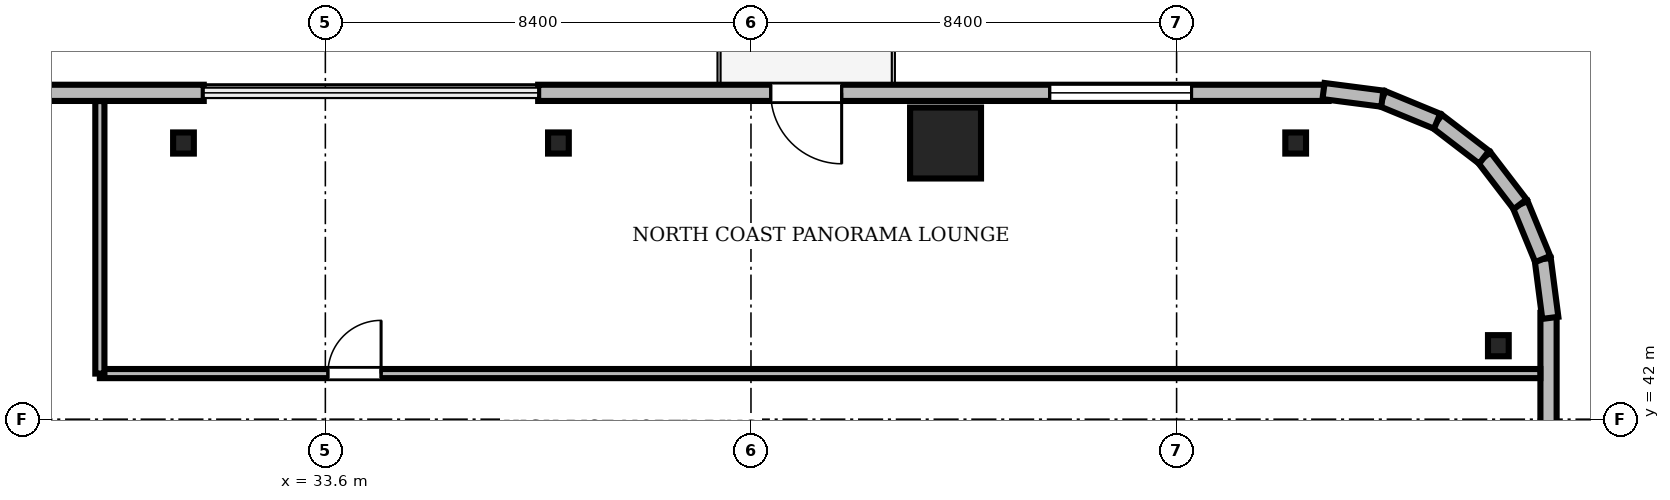
"""IFC4 building model, lengths in metres.
Left out: names, types, materials, properties, quantities, classifications, styles, units other than length and angle.
Written with IfcOpenShell. Run it as: python <this file> out.ifc"""

import sys

from ifc_helpers import new_model, si_unit, direction, frame, frame_2d, origin, origin_2d, place, context, subcontext, project, spatial, rectangle, i_section, extrude, source, transform, mapped, element, fill, save


model = new_model("IFC4")
c1 = context("Model", 3, precision=1e-05, world=origin(), true_north=direction((0.0, 1.0)))
c2 = subcontext(c1, "Body", "Model", "MODEL_VIEW")
j1 = project(units=[si_unit("LENGTHUNIT", "METRE"), si_unit("PLANEANGLEUNIT", "RADIAN")], contexts=[c1])
p1 = place(None, origin())
s1 = spatial("IfcSite", under=j1, at=p1, CompositionType="ELEMENT")
p2 = place(p1, origin())
s2 = spatial("IfcBuilding", under=s1, at=p2, CompositionType="ELEMENT")
p3 = place(p2, frame((0.0, 0.0, 203.55)))
s3 = spatial("IfcBuildingStorey", under=s2, at=p3, CompositionType="ELEMENT", Elevation=203.55)
m1 = source(origin(), c2, "Body", "SweptSolid", [
    extrude(rectangle(XDim=1.4, YDim=1.4, at=origin_2d()), origin(), (0.0, 0.0, 1.0), 3.53),
])
p4 = place(p3, frame((45.84, 47.45, 0.0), z_axis=(0.0, 0.0, 1.0), x_axis=(1.0, 0.0, 0.0)))
e1 = element("IfcColumn", 1, at=p4, inside=s3, PredefinedType="COLUMN", context=c2, shape_type="MappedRepresentation", body=[
    mapped(m1, transform((0.0, 0.0, 0.0), scale=1.0)),
])
m2 = source(origin(), c2, "Body", "SweptSolid", [
    extrude(i_section(OverallWidth=0.409, OverallDepth=0.417, WebThickness=0.021, FlangeThickness=0.033, FilletRadius=0.015, at=origin_2d()), origin(), (0.0, 0.0, 1.0), 3.53),
])
for number, where, z_axis, x_axis in (
    (2, (56.75, 43.45, 0.0), (0.0, 0.0, 1.0), (1.0, 0.0, 0.0)),
    (3, (52.75, 47.45, 0.0), (0.0, 0.0, 1.0), (1.0, 0.0, 0.0)),
    (4, (38.2, 47.45, 0.0), (0.0, 0.0, 1.0), (1.0, 0.0, 0.0)),
    (5, (30.8, 47.45, 0.0), (0.0, 0.0, 1.0), (1.0, 0.0, 0.0)),
):
    element("IfcColumn", number, at=place(p3, frame(where, z_axis=z_axis, x_axis=x_axis)), inside=s3, PredefinedType="COLUMN", context=c2, shape_type="MappedRepresentation", body=[
        mapped(m2, transform((0.0, 0.0, 0.0), scale=1.0)),
    ])
m3 = source(origin(), c2, "Body", "SweptSolid", [
    extrude(rectangle(XDim=15.6, YDim=0.32, at=frame_2d((7.8, 0.0))), origin(), (0.0, 0.0, 1.0), 3.53),
])
p5 = place(p3, frame((53.4, 48.44, 0.0), z_axis=(0.0, 0.0, 1.0), x_axis=(-1.0, 0.0, 0.0)))
e6 = element("IfcWall", 6, at=p5, inside=s3, PredefinedType="SOLIDWALL", context=c2, shape_type="MappedRepresentation", body=[
    mapped(m3, transform((0.0, 0.0, 0.0), scale=1.0)),
])
m4 = source(origin(), c2, "Body", "SweptSolid", [
    extrude(rectangle(XDim=1.4, YDim=2.3, at=frame_2d((0.7, 1.15))), frame((0.0, 0.17, 0.0), z_axis=(0.0, -1.0, 0.0), x_axis=(1.0, 0.0, 0.0)), (0.0, 0.0, 1.0), 0.34),
])
p6 = place(p5, frame((9.61, 0.0, 0.0)))
e7 = element("IfcOpeningElement", 7, at=p6, cuts=e6, PredefinedType="OPENING", context=c2, shape_type="MappedRepresentation", body=[
    mapped(m4, transform((0.0, 0.0, 0.0), scale=1.0)),
])
m5 = source(origin(), c2, "Body", "SweptSolid", [
    extrude(rectangle(XDim=2.8, YDim=2.4, at=frame_2d((1.4, 1.2))), frame((0.0, 0.17, 0.0), z_axis=(0.0, -1.0, 0.0), x_axis=(1.0, 0.0, 0.0)), (0.0, 0.0, 1.0), 0.34),
])
p7 = place(p5, frame((2.705, 0.0, 0.72)))
e8 = element("IfcOpeningElement", 8, at=p7, cuts=e6, PredefinedType="OPENING", context=c2, shape_type="MappedRepresentation", body=[
    mapped(m5, transform((0.0, 0.0, 0.0), scale=1.0)),
])
p8 = place(p3, frame((31.2, 48.44, 0.0), z_axis=(0.0, 0.0, 1.0), x_axis=(-1.0, 0.0, 0.0)))
e9 = element("IfcWall", 9, at=p8, inside=s3, PredefinedType="SOLIDWALL", context=c2, shape_type="MappedRepresentation", body=[
    mapped(m3, transform((0.0, 0.0, 0.0), scale=1.0)),
])
p9 = place(p8, frame((10.095, 0.0, 0.72)))
e10 = element("IfcOpeningElement", 10, at=p9, cuts=e9, PredefinedType="OPENING", context=c2, shape_type="MappedRepresentation", body=[
    mapped(m5, transform((0.0, 0.0, 0.0), scale=1.0)),
])
m6 = source(origin(), c2, "Body", "SweptSolid", [
    extrude(rectangle(XDim=15.6, YDim=0.32, at=frame_2d((7.8, 0.0))), origin(), (0.0, 0.0, 1.0), 3.53),
])
p10 = place(p3, frame((57.74, 28.5, 0.0), z_axis=(0.0, 0.0, 1.0), x_axis=(0.0, 1.0, 0.0)))
e11 = element("IfcWall", 11, at=p10, inside=s3, PredefinedType="SOLIDWALL", context=c2, shape_type="MappedRepresentation", body=[
    mapped(m6, transform((0.0, 0.0, 0.0), scale=1.0)),
])
p11 = place(p10, frame((10.095, 0.0, 0.72)))
e12 = element("IfcOpeningElement", 12, at=p11, cuts=e11, PredefinedType="OPENING", context=c2, shape_type="MappedRepresentation", body=[
    mapped(m5, transform((0.0, 0.0, 0.0), scale=1.0)),
])
m7 = source(origin(), c2, "Body", "SweptSolid", [
    extrude(rectangle(XDim=1.17, YDim=0.32, at=frame_2d((0.585, 0.0))), origin(), (0.0, 0.0, 1.0), 3.53),
])
p12 = place(p3, frame((57.776, 44.0, 0.0), z_axis=(0.0, 0.0, 1.0), x_axis=(-0.128295670475, 0.991735963317, 0.0)))
e13 = element("IfcWall", 13, at=p12, inside=s3, PredefinedType="SOLIDWALL", context=c2, shape_type="MappedRepresentation", body=[
    mapped(m7, transform((0.0, 0.0, 0.0), scale=1.0)),
])
m8 = source(origin(), c2, "Body", "SweptSolid", [
    extrude(rectangle(XDim=1.169, YDim=0.32, at=frame_2d((0.584, 0.0))), origin(), (0.0, 0.0, 1.0), 3.53),
])
p13 = place(p3, frame((57.625, 45.16, 0.0), z_axis=(0.0, 0.0, 1.0), x_axis=(-0.381054331552, 0.924552646638, 0.0)))
e14 = element("IfcWall", 14, at=p13, inside=s3, PredefinedType="SOLIDWALL", context=c2, shape_type="MappedRepresentation", body=[
    mapped(m8, transform((0.0, 0.0, 0.0), scale=1.0)),
])
m9 = source(origin(), c2, "Body", "SweptSolid", [
    extrude(rectangle(XDim=1.169, YDim=0.32, at=frame_2d((0.584, 0.0))), origin(), (0.0, 0.0, 1.0), 3.53),
])
p14 = place(p3, frame((57.18, 46.241, 0.0), z_axis=(0.0, 0.0, 1.0), x_axis=(-0.608387696831, 0.793639975269, 0.0)))
e15 = element("IfcWall", 15, at=p14, inside=s3, PredefinedType="SOLIDWALL", context=c2, shape_type="MappedRepresentation", body=[
    mapped(m9, transform((0.0, 0.0, 0.0), scale=1.0)),
])
m10 = source(origin(), c2, "Body", "SweptSolid", [
    extrude(rectangle(XDim=1.169, YDim=0.32, at=frame_2d((0.584, 0.0))), origin(), (0.0, 0.0, 1.0), 3.53),
])
p15 = place(p3, frame((56.469, 47.169, 0.0), z_axis=(0.0, 0.0, 1.0), x_axis=(-0.793663520347, 0.608356981114, 0.0)))
e16 = element("IfcWall", 16, at=p15, inside=s3, PredefinedType="SOLIDWALL", context=c2, shape_type="MappedRepresentation", body=[
    mapped(m10, transform((0.0, 0.0, 0.0), scale=1.0)),
])
p16 = place(p3, frame((55.541, 47.88, 0.0), z_axis=(0.0, 0.0, 1.0), x_axis=(-0.924552646638, 0.381054331552, 0.0)))
e17 = element("IfcWall", 17, at=p16, inside=s3, PredefinedType="SOLIDWALL", context=c2, shape_type="MappedRepresentation", body=[
    mapped(m8, transform((0.0, 0.0, 0.0), scale=1.0)),
])
p17 = place(p3, frame((54.46, 48.325, 0.0), z_axis=(0.0, 0.0, 1.0), x_axis=(-0.991735963317, 0.128295670475, 0.0)))
e18 = element("IfcWall", 18, at=p17, inside=s3, PredefinedType="SOLIDWALL", context=c2, shape_type="MappedRepresentation", body=[
    mapped(m7, transform((0.0, 0.0, 0.0), scale=1.0)),
])
m11 = source(origin(), c2, "Body", "SweptSolid", [
    extrude(rectangle(XDim=28.428, YDim=0.18, at=frame_2d((14.214, 0.0))), origin(), (0.0, 0.0, 1.0), 2.772),
])
p18 = place(p3, frame((29.15, 42.9, 0.0), z_axis=(0.0, 0.0, 1.0), x_axis=(1.0, 0.0, 0.0)))
e19 = element("IfcWall", 19, at=p18, inside=s3, PredefinedType="PARTITIONING", context=c2, shape_type="MappedRepresentation", body=[
    mapped(m11, transform((0.0, 0.0, 0.0), scale=1.0)),
])
m12 = source(origin(), c2, "Body", "SweptSolid", [
    extrude(rectangle(XDim=1.05, YDim=2.2, at=frame_2d((0.525, 1.1))), frame((0.0, 0.1, 0.0), z_axis=(0.0, -1.0, 0.0), x_axis=(1.0, 0.0, 0.0)), (0.0, 0.0, 1.0), 0.2),
])
p19 = place(p18, frame((4.5, 0.0, 0.0)))
e20 = element("IfcOpeningElement", 20, at=p19, cuts=e19, PredefinedType="OPENING", context=c2, shape_type="MappedRepresentation", body=[
    mapped(m12, transform((0.0, 0.0, 0.0), scale=1.0)),
])
m13 = source(origin(), c2, "Body", "SweptSolid", [
    extrude(rectangle(XDim=5.378, YDim=0.18, at=frame_2d((2.689, 0.0))), origin(), (0.0, 0.0, 1.0), 2.772),
])
p20 = place(p3, frame((29.15, 42.9, 0.0), z_axis=(0.0, 0.0, 1.0), x_axis=(0.0, 1.0, 0.0)))
e21 = element("IfcWall", 21, at=p20, inside=s3, PredefinedType="PARTITIONING", context=c2, shape_type="MappedRepresentation", body=[
    mapped(m13, transform((0.0, 0.0, 0.0), scale=1.0)),
])
m14 = source(origin(), c2, "Body", "SweptSolid", [
    extrude(rectangle(XDim=1.4, YDim=2.3, at=frame_2d((0.7, 1.15))), frame((0.0, 0.025, 0.0), z_axis=(0.0, -1.0, 0.0), x_axis=(1.0, 0.0, 0.0)), (0.0, 0.0, 1.0), 0.05),
])
p21 = place(p6, frame((1.4, 0.0, 0.0), z_axis=(0.0, 0.0, 1.0), x_axis=(-1.0, 0.0, 0.0)))
e22 = element("IfcDoor", 22, at=p21, inside=s3, OperationType="DOUBLE_DOOR_SLIDING", PredefinedType="DOOR", context=c2, shape_type="MappedRepresentation", body=[
    mapped(m14, transform((0.0, 0.0, 0.0), scale=1.0)),
])
fill(e7, e22)
m15 = source(origin(), c2, "Body", "SweptSolid", [
    extrude(rectangle(XDim=2.8, YDim=2.4, at=frame_2d((1.4, 1.2))), frame((0.0, 0.03, 0.0), z_axis=(0.0, -1.0, 0.0), x_axis=(1.0, 0.0, 0.0)), (0.0, 0.0, 1.0), 0.06),
])
p22 = place(p7, origin())
e23 = element("IfcWindow", 23, at=p22, inside=s3, PartitioningType="SINGLE_PANEL", PredefinedType="WINDOW", context=c2, shape_type="MappedRepresentation", body=[
    mapped(m15, transform((0.0, 0.0, 0.0), scale=1.0)),
])
fill(e8, e23)
m16 = source(origin(), c2, "Body", "SweptSolid", [
    extrude(rectangle(XDim=1.05, YDim=2.2, at=frame_2d((0.525, 1.1))), frame((0.0, 0.025, 0.0), z_axis=(0.0, -1.0, 0.0), x_axis=(1.0, 0.0, 0.0)), (0.0, 0.0, 1.0), 0.05),
])
p23 = place(p19, origin())
e24 = element("IfcDoor", 24, at=p23, inside=s3, OperationType="SINGLE_SWING_RIGHT", PredefinedType="DOOR", context=c2, shape_type="MappedRepresentation", body=[
    mapped(m16, transform((0.0, 0.0, 0.0), scale=1.0)),
])
fill(e20, e24)
save(model, sys.argv[1])
